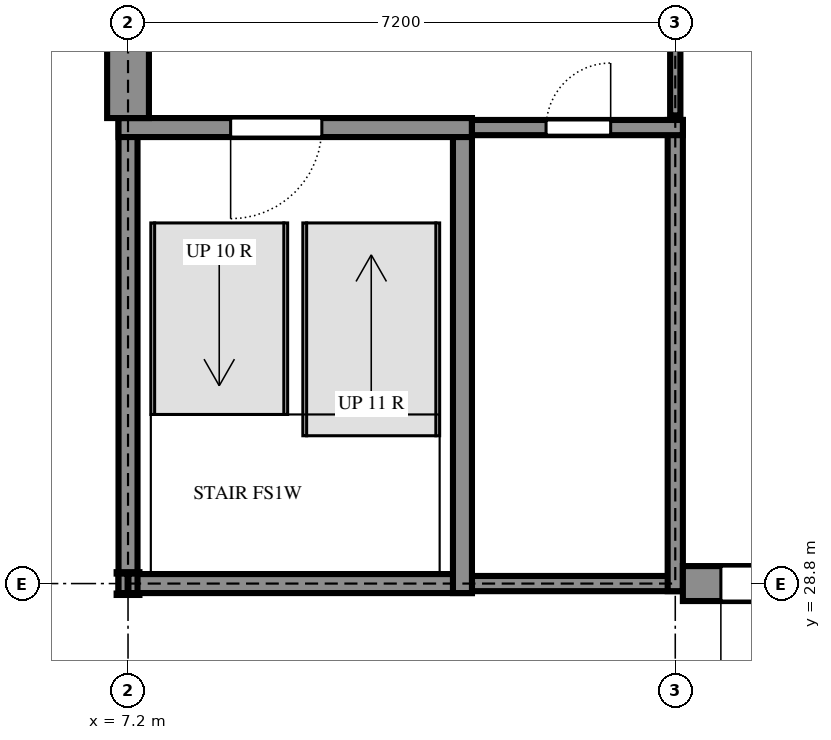
"""IFC4 building model, lengths in metres.
Left out: names, types, materials, properties, quantities, classifications, styles, units other than length and angle.
Written with IfcOpenShell. Run it as: python <this file> out.ifc"""

import sys

from ifc_helpers import new_model, si_unit, direction, frame, frame_2d, origin, origin_2d, place, context, subcontext, project, spatial, rectangle, i_section, extrude, element, fill, save


model = new_model("IFC4")
c1 = context("Model", 3, precision=1e-05, world=origin(), true_north=direction((0.0, 1.0)))
c2 = subcontext(c1, "Body", "Model", "MODEL_VIEW")
j1 = project(units=[si_unit("LENGTHUNIT", "METRE"), si_unit("PLANEANGLEUNIT", "RADIAN")], contexts=[c1])
p1 = place(None, origin())
s1 = spatial("IfcSite", under=j1, at=p1, CompositionType="ELEMENT")
p2 = place(p1, origin())
s2 = spatial("IfcBuilding", under=s1, at=p2, CompositionType="ELEMENT")
p3 = place(p2, origin())
s3 = spatial("IfcBuildingStorey", under=s2, at=p3, CompositionType="ELEMENT", Elevation=0.0)
p4 = place(p3, frame((7.2, 28.8, -0.3), z_axis=(0.0, 0.0, 1.0), x_axis=(1.0, 0.0, 0.0)))
e1 = element("IfcColumn", 1, at=p4, inside=s3, PredefinedType="COLUMN", context=c2, shape_type="SweptSolid", body=[
    extrude(i_section(OverallWidth=0.3, OverallDepth=0.3, WebThickness=0.011, FlangeThickness=0.019, FilletRadius=0.027, at=origin_2d()), origin(), (0.0, 0.0, 1.0), 3.9),
])
p5 = place(p3, frame((7.075, 28.8, 0.0), z_axis=(0.0, 0.0, 1.0), x_axis=(1.0, 0.0, 0.0)))
e2 = element("IfcWall", 2, at=p5, inside=s3, PredefinedType="SHEAR", context=c2, shape_type="SweptSolid", body=[
    extrude(rectangle(XDim=4.65, YDim=0.25, at=frame_2d((2.325, 0.0))), origin(), (0.0, 0.0, 1.0), 3.6),
])
p6 = place(p3, frame((11.725, 28.8, 0.0), z_axis=(0.0, 0.0, 1.0), x_axis=(1.0, 0.0, 0.0)))
e3 = element("IfcWall", 3, at=p6, inside=s3, PredefinedType="SHEAR", context=c2, shape_type="SweptSolid", body=[
    extrude(rectangle(XDim=2.775, YDim=0.2, at=frame_2d((1.387, 0.0))), origin(), (0.0, 0.0, 1.0), 3.6),
])
p7 = place(p3, frame((11.6, 28.675, 0.0), z_axis=(0.0, 0.0, 1.0), x_axis=(0.0, 1.0, 0.0)))
e4 = element("IfcWall", 4, at=p7, inside=s3, PredefinedType="SHEAR", context=c2, shape_type="SweptSolid", body=[
    extrude(rectangle(XDim=6.25, YDim=0.25, at=frame_2d((3.125, 0.0))), origin(), (0.0, 0.0, 1.0), 3.6),
])
p8 = place(p3, frame((14.4, 28.7, 0.0), z_axis=(0.0, 0.0, 1.0), x_axis=(0.0, 1.0, 0.0)))
e5 = element("IfcWall", 5, at=p8, inside=s3, PredefinedType="SHEAR", context=c2, shape_type="SweptSolid", body=[
    extrude(rectangle(XDim=6.2, YDim=0.2, at=frame_2d((3.1, 0.0))), origin(), (0.0, 0.0, 1.0), 3.6),
])
p9 = place(p3, frame((7.2, 34.925, 0.0), z_axis=(0.0, 0.0, 1.0), x_axis=(0.0, -1.0, 0.0)))
e6 = element("IfcWall", 6, at=p9, inside=s3, PredefinedType="SHEAR", context=c2, shape_type="SweptSolid", body=[
    extrude(rectangle(XDim=6.25, YDim=0.25, at=frame_2d((3.125, 0.0))), origin(), (0.0, 0.0, 1.0), 3.6),
])
p10 = place(p3, frame((11.725, 34.8, 0.0), z_axis=(0.0, 0.0, 1.0), x_axis=(-1.0, 0.0, 0.0)))
e7 = element("IfcWall", 7, at=p10, inside=s3, PredefinedType="SHEAR", context=c2, shape_type="SweptSolid", body=[
    extrude(rectangle(XDim=4.65, YDim=0.25, at=frame_2d((2.325, 0.0))), origin(), (0.0, 0.0, 1.0), 3.6),
])
p11 = place(p10, frame((1.975, 0.0, 0.0)))
e8 = element("IfcOpeningElement", 8, at=p11, cuts=e7, PredefinedType="OPENING", context=c2, shape_type="SweptSolid", body=[
    extrude(rectangle(XDim=1.2, YDim=2.4, at=frame_2d((0.6, 1.2))), frame((0.0, 0.135, 0.0), z_axis=(0.0, -1.0, 0.0), x_axis=(1.0, 0.0, 0.0)), (0.0, 0.0, 1.0), 0.27),
])
p12 = place(p3, frame((14.5, 34.8, 0.0), z_axis=(0.0, 0.0, 1.0), x_axis=(-1.0, 0.0, 0.0)))
e9 = element("IfcWall", 9, at=p12, inside=s3, PredefinedType="SHEAR", context=c2, shape_type="SweptSolid", body=[
    extrude(rectangle(XDim=2.775, YDim=0.2, at=frame_2d((1.387, 0.0))), origin(), (0.0, 0.0, 1.0), 3.6),
])
p13 = place(p12, frame((0.95, 0.0, 0.0)))
e10 = element("IfcOpeningElement", 10, at=p13, cuts=e9, PredefinedType="OPENING", context=c2, shape_type="SweptSolid", body=[
    extrude(rectangle(XDim=0.85, YDim=2.1, at=frame_2d((0.425, 1.05))), frame((0.0, 0.11, 0.0), z_axis=(0.0, -1.0, 0.0), x_axis=(1.0, 0.0, 0.0)), (0.0, 0.0, 1.0), 0.22),
])
p14 = place(p3, frame((7.2, 34.925, 0.0), z_axis=(0.0, 0.0, 1.0), x_axis=(0.0, 1.0, 0.0)))
e11 = element("IfcWall", 11, at=p14, inside=s3, PredefinedType="SOLIDWALL", context=c2, shape_type="SweptSolid", body=[
    extrude(rectangle(XDim=1.225, YDim=0.55, at=frame_2d((0.612, 0.0))), origin(), (0.0, 0.0, 1.0), 3.6),
])
p15 = place(p3, frame((14.5, 28.8, 0.0), z_axis=(0.0, 0.0, 1.0), x_axis=(1.0, 0.0, 0.0)))
e12 = element("IfcWall", 12, at=p15, inside=s3, PredefinedType="SOLIDWALL", context=c2, shape_type="SweptSolid", body=[
    extrude(rectangle(XDim=5.3, YDim=0.46, at=frame_2d((2.65, 0.0))), origin(), (0.0, 0.0, 1.0), 3.42),
])
p16 = place(p15, frame((0.5, 0.0, 0.0)))
e13 = element("IfcOpeningElement", 13, at=p16, cuts=e12, PredefinedType="OPENING", context=c2, shape_type="SweptSolid", body=[
    extrude(rectangle(XDim=2.4, YDim=2.1, at=frame_2d((1.2, 1.05))), frame((0.0, 0.24, 0.0), z_axis=(0.0, -1.0, 0.0), x_axis=(1.0, 0.0, 0.0)), (0.0, 0.0, 1.0), 0.48),
])
p17 = place(p3, frame((14.4, 35.89, 0.0), z_axis=(0.0, 0.0, 1.0), x_axis=(0.0, -1.0, 0.0)))
e14 = element("IfcWall", 14, at=p17, inside=s3, PredefinedType="PARTITIONING", context=c2, shape_type="SweptSolid", body=[
    extrude(rectangle(XDim=0.93, YDim=0.135, at=frame_2d((0.465, 0.0))), origin(), (0.0, 0.0, 1.0), 3.219),
])
p18 = place(p16, frame((2.4, 0.0, 0.0), z_axis=(0.0, 0.0, 1.0), x_axis=(-1.0, 0.0, 0.0)))
e15 = element("IfcDoor", 15, at=p18, inside=s3, OperationType="DOUBLE_DOOR_SINGLE_SWING", PredefinedType="DOOR", context=c2, shape_type="SweptSolid", body=[
    extrude(rectangle(XDim=2.4, YDim=2.1, at=frame_2d((1.2, 1.05))), frame((0.0, 0.025, 0.0), z_axis=(0.0, -1.0, 0.0), x_axis=(1.0, 0.0, 0.0)), (0.0, 0.0, 1.0), 0.05),
])
fill(e13, e15)
p19 = place(p11, origin())
e16 = element("IfcDoor", 16, at=p19, inside=s3, OperationType="SINGLE_SWING_LEFT", PredefinedType="DOOR", context=c2, shape_type="SweptSolid", body=[
    extrude(rectangle(XDim=1.2, YDim=2.4, at=frame_2d((0.6, 1.2))), frame((0.0, 0.025, 0.0), z_axis=(0.0, -1.0, 0.0), x_axis=(1.0, 0.0, 0.0)), (0.0, 0.0, 1.0), 0.05),
])
fill(e8, e16)
p20 = place(p13, frame((0.85, 0.0, 0.0), z_axis=(0.0, 0.0, 1.0), x_axis=(-1.0, 0.0, 0.0)))
e17 = element("IfcDoor", 17, at=p20, inside=s3, OperationType="SINGLE_SWING_LEFT", PredefinedType="DOOR", context=c2, shape_type="SweptSolid", body=[
    extrude(rectangle(XDim=0.85, YDim=2.1, at=frame_2d((0.425, 1.05))), frame((0.0, 0.025, 0.0), z_axis=(0.0, -1.0, 0.0), x_axis=(1.0, 0.0, 0.0)), (0.0, 0.0, 1.0), 0.05),
])
fill(e10, e17)
save(model, sys.argv[1])
